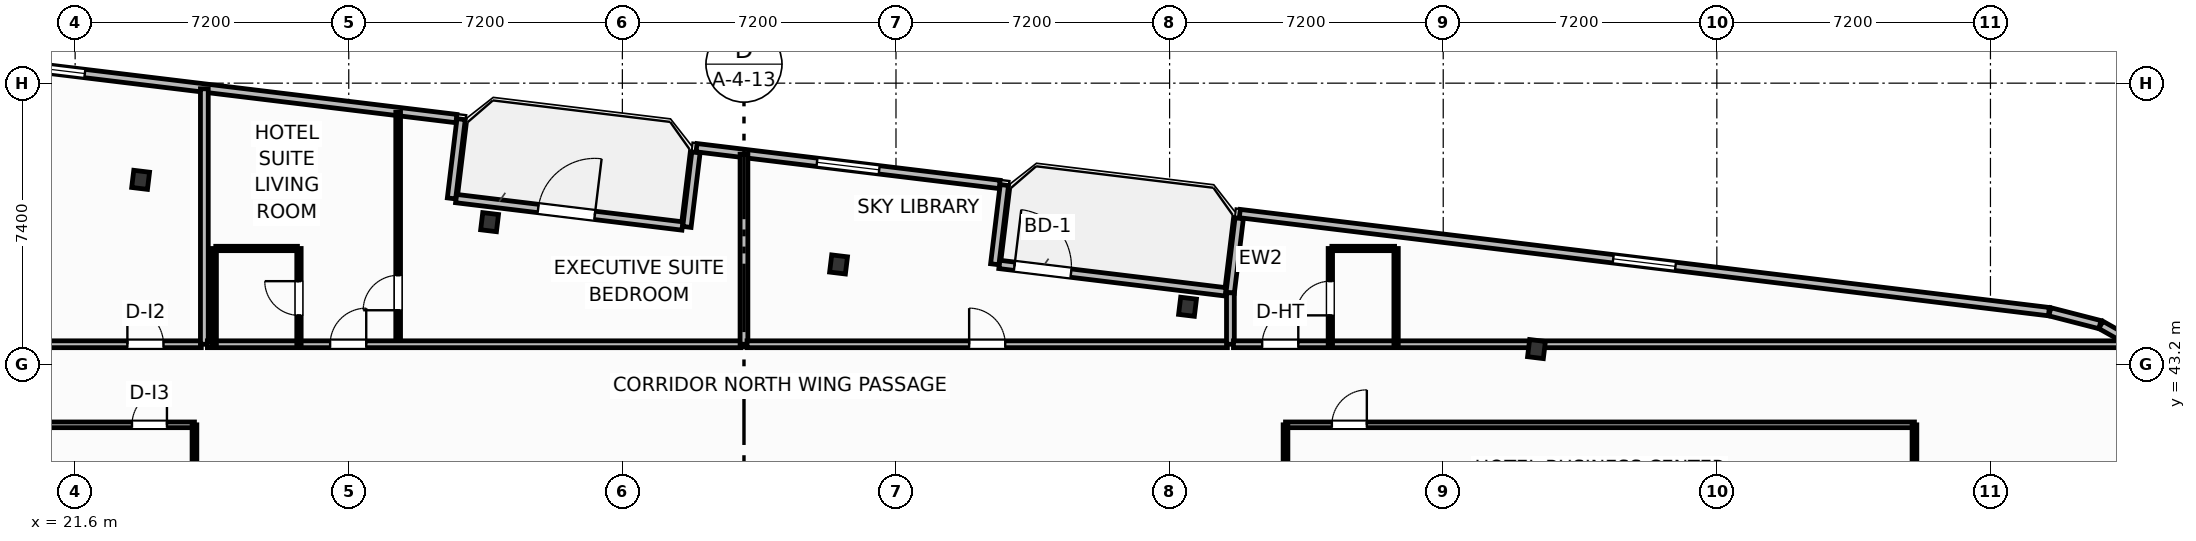
"""IFC4 building model, lengths in metres.
Left out: names, types, materials, properties, quantities, classifications, styles, units other than length and angle.
Written with IfcOpenShell. Run it as: python <this file> out.ifc"""

import sys

from ifc_helpers import new_model, si_unit, direction, frame, frame_2d, origin, origin_2d, place, context, subcontext, project, spatial, rectangle, i_section, extrude, element, fill, save


model = new_model("IFC4")
c1 = context("Model", 3, precision=1e-05, world=origin(), true_north=direction((0.0, 1.0)))
c2 = subcontext(c1, "Body", "Model", "MODEL_VIEW")
j1 = project(units=[si_unit("LENGTHUNIT", "METRE"), si_unit("PLANEANGLEUNIT", "RADIAN")], contexts=[c1])
p1 = place(None, origin())
s1 = spatial("IfcSite", under=j1, at=p1, CompositionType="ELEMENT")
p2 = place(p1, origin())
s2 = spatial("IfcBuilding", under=s1, at=p2, CompositionType="ELEMENT")
p3 = place(p2, frame((0.0, 0.0, 151.3)))
s3 = spatial("IfcBuildingStorey", under=s2, at=p3, CompositionType="ELEMENT", Elevation=151.3)
for number, where, z_axis, x_axis in (
    (1, (60.054, 43.603, 0.0), (0.0, 0.0, 1.0), (0.993, -0.12, 0.0)),
    (2, (50.872, 44.717, 0.0), (0.0, 0.0, 1.0), (0.993, -0.12, 0.0)),
    (3, (41.689, 45.83, 0.0), (0.0, 0.0, 1.0), (0.993, -0.12, 0.0)),
    (4, (32.506, 46.943, 0.0), (0.0, 0.0, 1.0), (0.993, -0.12, 0.0)),
    (5, (23.323, 48.056, 0.0), (0.0, 0.0, 1.0), (0.993, -0.12, 0.0)),
):
    element("IfcColumn", number, at=place(p3, frame(where, z_axis=z_axis, x_axis=x_axis)), inside=s3, PredefinedType="COLUMN", context=c2, shape_type="SweptSolid", body=[
        extrude(i_section(OverallWidth=0.418, OverallDepth=0.455, WebThickness=0.042, FlangeThickness=0.068, FilletRadius=0.025, at=origin_2d()), origin(), (0.0, 0.0, 1.0), 3.7),
    ])
p4 = place(p3, frame((31.624, 47.563, 0.0), z_axis=(0.0, 0.0, 1.0), x_axis=(0.992729951822, -0.120362962556, 0.0)))
e6 = element("IfcWall", 6, at=p4, inside=s3, PredefinedType="SOLIDWALL", context=c2, shape_type="SweptSolid", body=[
    extrude(rectangle(XDim=6.0, YDim=0.22, at=frame_2d((3.0, 0.0))), origin(), (0.0, 0.0, 1.0), 2.73),
])
p5 = place(p4, frame((2.176, 0.0, 0.0)))
e7 = element("IfcOpeningElement", 7, at=p5, cuts=e6, PredefinedType="OPENING", context=c2, shape_type="SweptSolid", body=[
    extrude(rectangle(XDim=1.5, YDim=2.25, at=frame_2d((0.75, 1.125))), frame((0.0, 0.12, 0.0), z_axis=(0.0, -1.0, 0.0), x_axis=(1.0, 0.0, 0.0)), (0.0, 0.0, 1.0), 0.24),
])
p6 = place(p3, frame((45.92, 45.831, 0.0), z_axis=(0.0, 0.0, 1.0), x_axis=(0.992729951822, -0.120362962556, 0.0)))
e8 = element("IfcWall", 8, at=p6, inside=s3, PredefinedType="SOLIDWALL", context=c2, shape_type="SweptSolid", body=[
    extrude(rectangle(XDim=6.0, YDim=0.22, at=frame_2d((3.0, 0.0))), origin(), (0.0, 0.0, 1.0), 2.73),
])
p7 = place(p6, frame((0.4, 0.0, 0.0)))
e9 = element("IfcOpeningElement", 9, at=p7, cuts=e8, PredefinedType="OPENING", context=c2, shape_type="SweptSolid", body=[
    extrude(rectangle(XDim=1.5, YDim=2.25, at=frame_2d((0.75, 1.125))), frame((0.0, 0.12, 0.0), z_axis=(0.0, -1.0, 0.0), x_axis=(1.0, 0.0, 0.0)), (0.0, 0.0, 1.0), 0.24),
])
p8 = place(p3, frame((76.084, 43.575, 0.0), z_axis=(0.0, 0.0, 1.0), x_axis=(-0.871093268227, 0.491117621399, 0.0)))
e10 = element("IfcWall", 10, at=p8, inside=s3, PredefinedType="SOLIDWALL", context=c2, shape_type="SweptSolid", body=[
    extrude(rectangle(XDim=1.353, YDim=0.22, at=frame_2d((0.677, 0.0))), origin(), (0.0, 0.0, 1.0), 2.73),
])
p9 = place(p3, frame((74.881, 44.246, 0.0), z_axis=(0.0, 0.0, 1.0), x_axis=(-0.968549775063, 0.248819881091, 0.0)))
e11 = element("IfcWall", 11, at=p9, inside=s3, PredefinedType="SOLIDWALL", context=c2, shape_type="SweptSolid", body=[
    extrude(rectangle(XDim=1.361, YDim=0.22, at=frame_2d((0.68, 0.0))), origin(), (0.0, 0.0, 1.0), 2.73),
])
p10 = place(p3, frame((73.538, 44.588, 0.0), z_axis=(0.0, 0.0, 1.0), x_axis=(-0.992733493583, 0.120333747213, 0.0)))
e12 = element("IfcWall", 12, at=p10, inside=s3, PredefinedType="SOLIDWALL", context=c2, shape_type="SweptSolid", body=[
    extrude(rectangle(XDim=21.447, YDim=0.22, at=frame_2d((10.724, 0.0))), origin(), (0.0, 0.0, 1.0), 2.73),
])
p11 = place(p10, frame((9.899, 0.0, 0.8)))
e13 = element("IfcOpeningElement", 13, at=p11, cuts=e12, PredefinedType="OPENING", context=c2, shape_type="SweptSolid", body=[
    extrude(rectangle(XDim=1.65, YDim=1.65, at=frame_2d((0.825, 0.825))), frame((0.0, 0.12, 0.0), z_axis=(0.0, -1.0, 0.0), x_axis=(1.0, 0.0, 0.0)), (0.0, 0.0, 1.0), 0.24),
])
p12 = place(p3, frame((52.231, 47.045, 0.0), z_axis=(0.0, 0.0, 1.0), x_axis=(-0.120275992932, -0.992740492538, 0.0)))
e14 = element("IfcWall", 14, at=p12, inside=s3, PredefinedType="SOLIDWALL", context=c2, shape_type="SweptSolid", body=[
    extrude(rectangle(XDim=1.975, YDim=0.22, at=frame_2d((0.988, 0.0))), origin(), (0.0, 0.0, 1.0), 2.73),
])
p13 = place(p3, frame((45.799, 45.835, 0.0), z_axis=(0.0, 0.0, 1.0), x_axis=(0.120314009587, 0.992735885871, 0.0)))
e15 = element("IfcWall", 15, at=p13, inside=s3, PredefinedType="SOLIDWALL", context=c2, shape_type="SweptSolid", body=[
    extrude(rectangle(XDim=2.1, YDim=0.22, at=frame_2d((1.05, 0.0))), origin(), (0.0, 0.0, 1.0), 2.73),
])
p14 = place(p3, frame((45.928, 47.935, 0.0), z_axis=(0.0, 0.0, 1.0), x_axis=(-0.992730591876, 0.120357683402, 0.0)))
e16 = element("IfcWall", 16, at=p14, inside=s3, PredefinedType="SOLIDWALL", context=c2, shape_type="SweptSolid", body=[
    extrude(rectangle(XDim=8.035, YDim=0.22, at=frame_2d((4.017, 0.0))), origin(), (0.0, 0.0, 1.0), 2.73),
])
p15 = place(p14, frame((3.192, 0.0, 0.8)))
e17 = element("IfcOpeningElement", 17, at=p15, cuts=e16, PredefinedType="OPENING", context=c2, shape_type="SweptSolid", body=[
    extrude(rectangle(XDim=1.65, YDim=1.65, at=frame_2d((0.825, 0.825))), frame((0.0, 0.12, 0.0), z_axis=(0.0, -1.0, 0.0), x_axis=(1.0, 0.0, 0.0)), (0.0, 0.0, 1.0), 0.24),
])
p16 = place(p3, frame((37.936, 48.778, 0.0), z_axis=(0.0, 0.0, 1.0), x_axis=(-0.120397815541, -0.992725725472, 0.0)))
e18 = element("IfcWall", 18, at=p16, inside=s3, PredefinedType="SOLIDWALL", context=c2, shape_type="SweptSolid", body=[
    extrude(rectangle(XDim=1.975, YDim=0.22, at=frame_2d((0.988, 0.0))), origin(), (0.0, 0.0, 1.0), 2.73),
])
p17 = place(p3, frame((31.504, 47.568, 0.0), z_axis=(0.0, 0.0, 1.0), x_axis=(0.120341784665, 0.992732519294, 0.0)))
e19 = element("IfcWall", 19, at=p17, inside=s3, PredefinedType="SOLIDWALL", context=c2, shape_type="SweptSolid", body=[
    extrude(rectangle(XDim=2.1, YDim=0.22, at=frame_2d((1.05, 0.0))), origin(), (0.0, 0.0, 1.0), 2.73),
])
p18 = place(p3, frame((31.633, 49.668, 0.0), z_axis=(0.0, 0.0, 1.0), x_axis=(-0.992731670483, 0.120348786531, 0.0)))
e20 = element("IfcWall", 20, at=p18, inside=s3, PredefinedType="SOLIDWALL", context=c2, shape_type="SweptSolid", body=[
    extrude(rectangle(XDim=21.347, YDim=0.22, at=frame_2d((10.674, 0.0))), origin(), (0.0, 0.0, 1.0), 2.73),
])
p19 = place(p18, frame((9.849, 0.0, 0.8)))
e21 = element("IfcOpeningElement", 21, at=p19, cuts=e20, PredefinedType="OPENING", context=c2, shape_type="SweptSolid", body=[
    extrude(rectangle(XDim=1.65, YDim=1.65, at=frame_2d((0.825, 0.825))), frame((0.0, 0.12, 0.0), z_axis=(0.0, -1.0, 0.0), x_axis=(1.0, 0.0, 0.0)), (0.0, 0.0, 1.0), 0.24),
])
p20 = place(p3, frame((5.0, 41.61, 0.0), z_axis=(0.0, 0.0, 1.0), x_axis=(1.0, 0.0, 0.0)))
e22 = element("IfcWall", 22, at=p20, inside=s3, PredefinedType="PARTITIONING", context=c2, shape_type="SweptSolid", body=[
    extrude(rectangle(XDim=19.74, YDim=0.15, at=frame_2d((9.87, 0.0))), origin(), (0.0, 0.0, 1.0), 3.45),
])
p21 = place(p20, frame((18.096, 0.0, 0.0)))
e23 = element("IfcOpeningElement", 23, at=p21, cuts=e22, PredefinedType="OPENING", context=c2, shape_type="SweptSolid", body=[
    extrude(rectangle(XDim=0.92, YDim=2.05, at=frame_2d((0.46, 1.025))), frame((0.0, 0.085, 0.0), z_axis=(0.0, -1.0, 0.0), x_axis=(1.0, 0.0, 0.0)), (0.0, 0.0, 1.0), 0.17),
])
p22 = place(p3, frame((24.74, 39.3, 0.0), z_axis=(0.0, 0.0, 1.0), x_axis=(0.0, 1.0, 0.0)))
e24 = element("IfcWall", 24, at=p22, inside=s3, PredefinedType="PARTITIONING", context=c2, shape_type="SweptSolid", body=[
    extrude(rectangle(XDim=2.31, YDim=0.125, at=frame_2d((1.155, 0.0))), origin(), (0.0, 0.0, 1.0), 3.45),
])
p23 = place(p3, frame((53.45, 41.61, 0.0), z_axis=(0.0, 0.0, 1.0), x_axis=(1.0, 0.0, 0.0)))
e25 = element("IfcWall", 25, at=p23, inside=s3, PredefinedType="PARTITIONING", context=c2, shape_type="SweptSolid", body=[
    extrude(rectangle(XDim=16.55, YDim=0.15, at=frame_2d((8.275, 0.0))), origin(), (0.0, 0.0, 1.0), 2.972),
])
p24 = place(p23, frame((1.22, 0.0, 0.0)))
e26 = element("IfcOpeningElement", 26, at=p24, cuts=e25, PredefinedType="OPENING", context=c2, shape_type="SweptSolid", body=[
    extrude(rectangle(XDim=0.92, YDim=2.05, at=frame_2d((0.46, 1.025))), frame((0.0, 0.085, 0.0), z_axis=(0.0, -1.0, 0.0), x_axis=(1.0, 0.0, 0.0)), (0.0, 0.0, 1.0), 0.17),
])
for number, where, z_axis, x_axis in (
    (27, (53.45, 39.3, 0.0), (0.0, 0.0, 1.0), (0.0, 1.0, 0.0)),
    (28, (70.0, 39.3, 0.0), (0.0, 0.0, 1.0), (0.0, 1.0, 0.0)),
):
    element("IfcWall", number, at=place(p3, frame(where, z_axis=z_axis, x_axis=x_axis)), inside=s3, PredefinedType="PARTITIONING", context=c2, shape_type="SweptSolid", body=[
        extrude(rectangle(XDim=2.31, YDim=0.125, at=frame_2d((1.155, 0.0))), origin(), (0.0, 0.0, 1.0), 3.45),
    ])
p25 = place(p3, frame((4.143, 43.73, 0.0), z_axis=(0.0, 0.0, 1.0), x_axis=(1.0, 0.0, 0.0)))
e29 = element("IfcWall", 29, at=p25, inside=s3, PredefinedType="PARTITIONING", context=c2, shape_type="SweptSolid", body=[
    extrude(rectangle(XDim=20.777, YDim=0.18, at=frame_2d((10.389, 0.0))), origin(), (0.0, 0.0, 1.0), 3.45),
])
p26 = place(p25, frame((18.832, 0.0, 0.0)))
e30 = element("IfcOpeningElement", 30, at=p26, cuts=e29, PredefinedType="OPENING", context=c2, shape_type="SweptSolid", body=[
    extrude(rectangle(XDim=0.95, YDim=2.05, at=frame_2d((0.475, 1.025))), frame((0.0, 0.1, 0.0), z_axis=(0.0, -1.0, 0.0), x_axis=(1.0, 0.0, 0.0)), (0.0, 0.0, 1.0), 0.2),
])
p27 = place(p3, frame((25.0, 43.73, 0.0), z_axis=(0.0, 0.0, 1.0), x_axis=(0.0, 1.0, 0.0)))
e31 = element("IfcWall", 31, at=p27, inside=s3, PredefinedType="PARTITIONING", context=c2, shape_type="SweptSolid", body=[
    extrude(rectangle(XDim=6.722, YDim=0.205, at=frame_2d((3.361, 0.0))), origin(), (0.0, 0.0, 1.0), 3.45),
])
p28 = place(p3, frame((30.1, 43.73, 0.0), z_axis=(0.0, 0.0, 1.0), x_axis=(0.0, 1.0, 0.0)))
e32 = element("IfcWall", 32, at=p28, inside=s3, PredefinedType="PARTITIONING", context=c2, shape_type="SweptSolid", body=[
    extrude(rectangle(XDim=6.104, YDim=0.125, at=frame_2d((3.052, 0.0))), origin(), (0.0, 0.0, 1.0), 3.45),
])
p29 = place(p28, frame((0.895, 0.0, 0.0)))
e33 = element("IfcOpeningElement", 33, at=p29, cuts=e32, PredefinedType="OPENING", context=c2, shape_type="SweptSolid", body=[
    extrude(rectangle(XDim=0.92, YDim=2.05, at=frame_2d((0.46, 1.025))), frame((0.0, 0.073, 0.0), z_axis=(0.0, -1.0, 0.0), x_axis=(1.0, 0.0, 0.0)), (0.0, 0.0, 1.0), 0.145),
])
p30 = place(p3, frame((25.08, 43.73, 0.0), z_axis=(0.0, 0.0, 1.0), x_axis=(1.0, 0.0, 0.0)))
e34 = element("IfcWall", 34, at=p30, inside=s3, PredefinedType="PARTITIONING", context=c2, shape_type="SweptSolid", body=[
    extrude(rectangle(XDim=14.04, YDim=0.18, at=frame_2d((7.02, 0.0))), origin(), (0.0, 0.0, 1.0), 2.972),
])
p31 = place(p30, frame((3.23, 0.0, 0.0)))
e35 = element("IfcOpeningElement", 35, at=p31, cuts=e34, PredefinedType="OPENING", context=c2, shape_type="SweptSolid", body=[
    extrude(rectangle(XDim=0.95, YDim=2.15, at=frame_2d((0.475, 1.075))), frame((0.0, 0.1, 0.0), z_axis=(0.0, -1.0, 0.0), x_axis=(1.0, 0.0, 0.0)), (0.0, 0.0, 1.0), 0.2),
])
p32 = place(p3, frame((25.3, 46.25, 0.0), z_axis=(0.0, 0.0, 1.0), x_axis=(1.0, 0.0, 0.0)))
e36 = element("IfcWall", 36, at=p32, inside=s3, PredefinedType="PARTITIONING", context=c2, shape_type="SweptSolid", body=[
    extrude(rectangle(XDim=2.15, YDim=0.115, at=frame_2d((1.075, 0.0))), origin(), (0.0, 0.0, 1.0), 3.45),
])
p33 = place(p3, frame((27.49, 43.73, 0.0), z_axis=(0.0, 0.0, 1.0), x_axis=(0.0, 1.0, 0.0)))
e37 = element("IfcWall", 37, at=p33, inside=s3, PredefinedType="PARTITIONING", context=c2, shape_type="SweptSolid", body=[
    extrude(rectangle(XDim=2.52, YDim=0.115, at=frame_2d((1.26, 0.0))), origin(), (0.0, 0.0, 1.0), 3.45),
])
p34 = place(p33, frame((0.76, 0.0, 0.0)))
e38 = element("IfcOpeningElement", 38, at=p34, cuts=e37, PredefinedType="OPENING", context=c2, shape_type="SweptSolid", body=[
    extrude(rectangle(XDim=0.9, YDim=2.05, at=frame_2d((0.45, 1.025))), frame((0.0, 0.067, 0.0), z_axis=(0.0, -1.0, 0.0), x_axis=(1.0, 0.0, 0.0)), (0.0, 0.0, 1.0), 0.135),
])
p35 = place(p3, frame((25.26, 43.73, 0.0), z_axis=(0.0, 0.0, 1.0), x_axis=(0.0, 1.0, 0.0)))
e39 = element("IfcWall", 39, at=p35, inside=s3, PredefinedType="PARTITIONING", context=c2, shape_type="SweptSolid", body=[
    extrude(rectangle(XDim=2.52, YDim=0.115, at=frame_2d((1.26, 0.0))), origin(), (0.0, 0.0, 1.0), 3.45),
])
p36 = place(p3, frame((39.2, 43.73, 0.0), z_axis=(0.0, 0.0, 1.0), x_axis=(0.0, 1.0, 0.0)))
e40 = element("IfcWall", 40, at=p36, inside=s3, PredefinedType="PARTITIONING", context=c2, shape_type="SweptSolid", body=[
    extrude(rectangle(XDim=5.0, YDim=0.205, at=frame_2d((2.5, 0.0))), origin(), (0.0, 0.0, 1.0), 3.45),
])
p37 = place(p3, frame((39.28, 43.73, 0.0), z_axis=(0.0, 0.0, 1.0), x_axis=(1.0, 0.0, 0.0)))
e41 = element("IfcWall", 41, at=p37, inside=s3, PredefinedType="PARTITIONING", context=c2, shape_type="SweptSolid", body=[
    extrude(rectangle(XDim=12.64, YDim=0.18, at=frame_2d((6.32, 0.0))), origin(), (0.0, 0.0, 1.0), 3.45),
])
p38 = place(p37, frame((5.845, 0.0, 0.0)))
e42 = element("IfcOpeningElement", 42, at=p38, cuts=e41, PredefinedType="OPENING", context=c2, shape_type="SweptSolid", body=[
    extrude(rectangle(XDim=0.95, YDim=2.05, at=frame_2d((0.475, 1.025))), frame((0.0, 0.1, 0.0), z_axis=(0.0, -1.0, 0.0), x_axis=(1.0, 0.0, 0.0)), (0.0, 0.0, 1.0), 0.2),
])
p39 = place(p3, frame((52.0, 43.73, 0.0), z_axis=(0.0, 0.0, 1.0), x_axis=(0.0, 1.0, 0.0)))
e43 = element("IfcWall", 43, at=p39, inside=s3, PredefinedType="PARTITIONING", context=c2, shape_type="SweptSolid", body=[
    extrude(rectangle(XDim=1.354, YDim=0.205, at=frame_2d((0.677, 0.0))), origin(), (0.0, 0.0, 1.0), 3.45),
])
p40 = place(p3, frame((52.08, 43.73, 0.0), z_axis=(0.0, 0.0, 1.0), x_axis=(1.0, 0.0, 0.0)))
e44 = element("IfcWall", 44, at=p40, inside=s3, PredefinedType="PARTITIONING", context=c2, shape_type="SweptSolid", body=[
    extrude(rectangle(XDim=23.689, YDim=0.18, at=frame_2d((11.845, 0.0))), origin(), (0.0, 0.0, 1.0), 2.824),
])
p41 = place(p40, frame((0.756, 0.0, 0.0)))
e45 = element("IfcOpeningElement", 45, at=p41, cuts=e44, PredefinedType="OPENING", context=c2, shape_type="SweptSolid", body=[
    extrude(rectangle(XDim=0.95, YDim=2.15, at=frame_2d((0.475, 1.075))), frame((0.0, 0.1, 0.0), z_axis=(0.0, -1.0, 0.0), x_axis=(1.0, 0.0, 0.0)), (0.0, 0.0, 1.0), 0.2),
])
p42 = place(p3, frame((54.67, 46.25, 0.0), z_axis=(0.0, 0.0, 1.0), x_axis=(1.0, 0.0, 0.0)))
e46 = element("IfcWall", 46, at=p42, inside=s3, PredefinedType="PARTITIONING", context=c2, shape_type="SweptSolid", body=[
    extrude(rectangle(XDim=1.65, YDim=0.115, at=frame_2d((0.825, 0.0))), origin(), (0.0, 0.0, 1.0), 3.45),
])
p43 = place(p3, frame((54.63, 43.73, 0.0), z_axis=(0.0, 0.0, 1.0), x_axis=(0.0, 1.0, 0.0)))
e47 = element("IfcWall", 47, at=p43, inside=s3, PredefinedType="PARTITIONING", context=c2, shape_type="SweptSolid", body=[
    extrude(rectangle(XDim=2.52, YDim=0.115, at=frame_2d((1.26, 0.0))), origin(), (0.0, 0.0, 1.0), 3.45),
])
p44 = place(p43, frame((0.76, 0.0, 0.0)))
e48 = element("IfcOpeningElement", 48, at=p44, cuts=e47, PredefinedType="OPENING", context=c2, shape_type="SweptSolid", body=[
    extrude(rectangle(XDim=0.9, YDim=2.05, at=frame_2d((0.45, 1.025))), frame((0.0, 0.067, 0.0), z_axis=(0.0, -1.0, 0.0), x_axis=(1.0, 0.0, 0.0)), (0.0, 0.0, 1.0), 0.135),
])
p45 = place(p3, frame((56.36, 43.73, 0.0), z_axis=(0.0, 0.0, 1.0), x_axis=(0.0, 1.0, 0.0)))
e49 = element("IfcWall", 49, at=p45, inside=s3, PredefinedType="PARTITIONING", context=c2, shape_type="SweptSolid", body=[
    extrude(rectangle(XDim=2.52, YDim=0.115, at=frame_2d((1.26, 0.0))), origin(), (0.0, 0.0, 1.0), 3.45),
])
p46 = place(p5, origin())
e50 = element("IfcDoor", 50, at=p46, inside=s3, OperationType="SINGLE_SWING_RIGHT", PredefinedType="DOOR", context=c2, shape_type="SweptSolid", body=[
    extrude(rectangle(XDim=1.5, YDim=2.25, at=frame_2d((0.75, 1.125))), frame((0.0, 0.025, 0.0), z_axis=(0.0, -1.0, 0.0), x_axis=(1.0, 0.0, 0.0)), (0.0, 0.0, 1.0), 0.05),
])
fill(e7, e50)
p47 = place(p7, origin())
e51 = element("IfcDoor", 51, at=p47, inside=s3, OperationType="SINGLE_SWING_LEFT", PredefinedType="DOOR", context=c2, shape_type="SweptSolid", body=[
    extrude(rectangle(XDim=1.5, YDim=2.25, at=frame_2d((0.75, 1.125))), frame((0.0, 0.025, 0.0), z_axis=(0.0, -1.0, 0.0), x_axis=(1.0, 0.0, 0.0)), (0.0, 0.0, 1.0), 0.05),
])
fill(e9, e51)
p48 = place(p11, origin())
e52 = element("IfcWindow", 52, at=p48, inside=s3, PartitioningType="SINGLE_PANEL", PredefinedType="WINDOW", context=c2, shape_type="SweptSolid", body=[
    extrude(rectangle(XDim=1.65, YDim=1.65, at=frame_2d((0.825, 0.825))), frame((0.0, 0.03, 0.0), z_axis=(0.0, -1.0, 0.0), x_axis=(1.0, 0.0, 0.0)), (0.0, 0.0, 1.0), 0.06),
])
fill(e13, e52)
p49 = place(p15, origin())
e53 = element("IfcWindow", 53, at=p49, inside=s3, PartitioningType="SINGLE_PANEL", PredefinedType="WINDOW", context=c2, shape_type="SweptSolid", body=[
    extrude(rectangle(XDim=1.65, YDim=1.65, at=frame_2d((0.825, 0.825))), frame((0.0, 0.03, 0.0), z_axis=(0.0, -1.0, 0.0), x_axis=(1.0, 0.0, 0.0)), (0.0, 0.0, 1.0), 0.06),
])
fill(e17, e53)
p50 = place(p19, origin())
e54 = element("IfcWindow", 54, at=p50, inside=s3, PartitioningType="SINGLE_PANEL", PredefinedType="WINDOW", context=c2, shape_type="SweptSolid", body=[
    extrude(rectangle(XDim=1.65, YDim=1.65, at=frame_2d((0.825, 0.825))), frame((0.0, 0.03, 0.0), z_axis=(0.0, -1.0, 0.0), x_axis=(1.0, 0.0, 0.0)), (0.0, 0.0, 1.0), 0.06),
])
fill(e21, e54)
p51 = place(p21, origin())
e55 = element("IfcDoor", 55, at=p51, inside=s3, OperationType="SINGLE_SWING_RIGHT", PredefinedType="DOOR", context=c2, shape_type="SweptSolid", body=[
    extrude(rectangle(XDim=0.92, YDim=2.05, at=frame_2d((0.46, 1.025))), frame((0.0, 0.025, 0.0), z_axis=(0.0, -1.0, 0.0), x_axis=(1.0, 0.0, 0.0)), (0.0, 0.0, 1.0), 0.05),
])
fill(e23, e55)
p52 = place(p24, origin())
e56 = element("IfcDoor", 56, at=p52, inside=s3, OperationType="SINGLE_SWING_RIGHT", PredefinedType="DOOR", context=c2, shape_type="SweptSolid", body=[
    extrude(rectangle(XDim=0.92, YDim=2.05, at=frame_2d((0.46, 1.025))), frame((0.0, 0.025, 0.0), z_axis=(0.0, -1.0, 0.0), x_axis=(1.0, 0.0, 0.0)), (0.0, 0.0, 1.0), 0.05),
])
fill(e26, e56)
p53 = place(p26, origin())
e57 = element("IfcDoor", 57, at=p53, inside=s3, OperationType="SINGLE_SWING_LEFT", PredefinedType="DOOR", context=c2, shape_type="SweptSolid", body=[
    extrude(rectangle(XDim=0.95, YDim=2.05, at=frame_2d((0.475, 1.025))), frame((0.0, 0.025, 0.0), z_axis=(0.0, -1.0, 0.0), x_axis=(1.0, 0.0, 0.0)), (0.0, 0.0, 1.0), 0.05),
])
fill(e30, e57)
p54 = place(p29, origin())
e58 = element("IfcDoor", 58, at=p54, inside=s3, OperationType="SINGLE_SWING_LEFT", PredefinedType="DOOR", context=c2, shape_type="SweptSolid", body=[
    extrude(rectangle(XDim=0.92, YDim=2.05, at=frame_2d((0.46, 1.025))), frame((0.0, 0.025, 0.0), z_axis=(0.0, -1.0, 0.0), x_axis=(1.0, 0.0, 0.0)), (0.0, 0.0, 1.0), 0.05),
])
fill(e33, e58)
p55 = place(p31, origin())
e59 = element("IfcDoor", 59, at=p55, inside=s3, OperationType="SINGLE_SWING_RIGHT", PredefinedType="DOOR", context=c2, shape_type="SweptSolid", body=[
    extrude(rectangle(XDim=0.95, YDim=2.15, at=frame_2d((0.475, 1.075))), frame((0.0, 0.025, 0.0), z_axis=(0.0, -1.0, 0.0), x_axis=(1.0, 0.0, 0.0)), (0.0, 0.0, 1.0), 0.05),
])
fill(e35, e59)
p56 = place(p34, origin())
e60 = element("IfcDoor", 60, at=p56, inside=s3, OperationType="SINGLE_SWING_RIGHT", PredefinedType="DOOR", context=c2, shape_type="SweptSolid", body=[
    extrude(rectangle(XDim=0.9, YDim=2.05, at=frame_2d((0.45, 1.025))), frame((0.0, 0.025, 0.0), z_axis=(0.0, -1.0, 0.0), x_axis=(1.0, 0.0, 0.0)), (0.0, 0.0, 1.0), 0.05),
])
fill(e38, e60)
p57 = place(p38, origin())
e61 = element("IfcDoor", 61, at=p57, inside=s3, OperationType="SINGLE_SWING_LEFT", PredefinedType="DOOR", context=c2, shape_type="SweptSolid", body=[
    extrude(rectangle(XDim=0.95, YDim=2.05, at=frame_2d((0.475, 1.025))), frame((0.0, 0.025, 0.0), z_axis=(0.0, -1.0, 0.0), x_axis=(1.0, 0.0, 0.0)), (0.0, 0.0, 1.0), 0.05),
])
fill(e42, e61)
p58 = place(p41, origin())
e62 = element("IfcDoor", 62, at=p58, inside=s3, OperationType="SINGLE_SWING_RIGHT", PredefinedType="DOOR", context=c2, shape_type="SweptSolid", body=[
    extrude(rectangle(XDim=0.95, YDim=2.15, at=frame_2d((0.475, 1.075))), frame((0.0, 0.025, 0.0), z_axis=(0.0, -1.0, 0.0), x_axis=(1.0, 0.0, 0.0)), (0.0, 0.0, 1.0), 0.05),
])
fill(e45, e62)
p59 = place(p44, origin())
e63 = element("IfcDoor", 63, at=p59, inside=s3, OperationType="SINGLE_SWING_LEFT", PredefinedType="DOOR", context=c2, shape_type="SweptSolid", body=[
    extrude(rectangle(XDim=0.9, YDim=2.05, at=frame_2d((0.45, 1.025))), frame((0.0, 0.025, 0.0), z_axis=(0.0, -1.0, 0.0), x_axis=(1.0, 0.0, 0.0)), (0.0, 0.0, 1.0), 0.05),
])
fill(e48, e63)
save(model, sys.argv[1])
